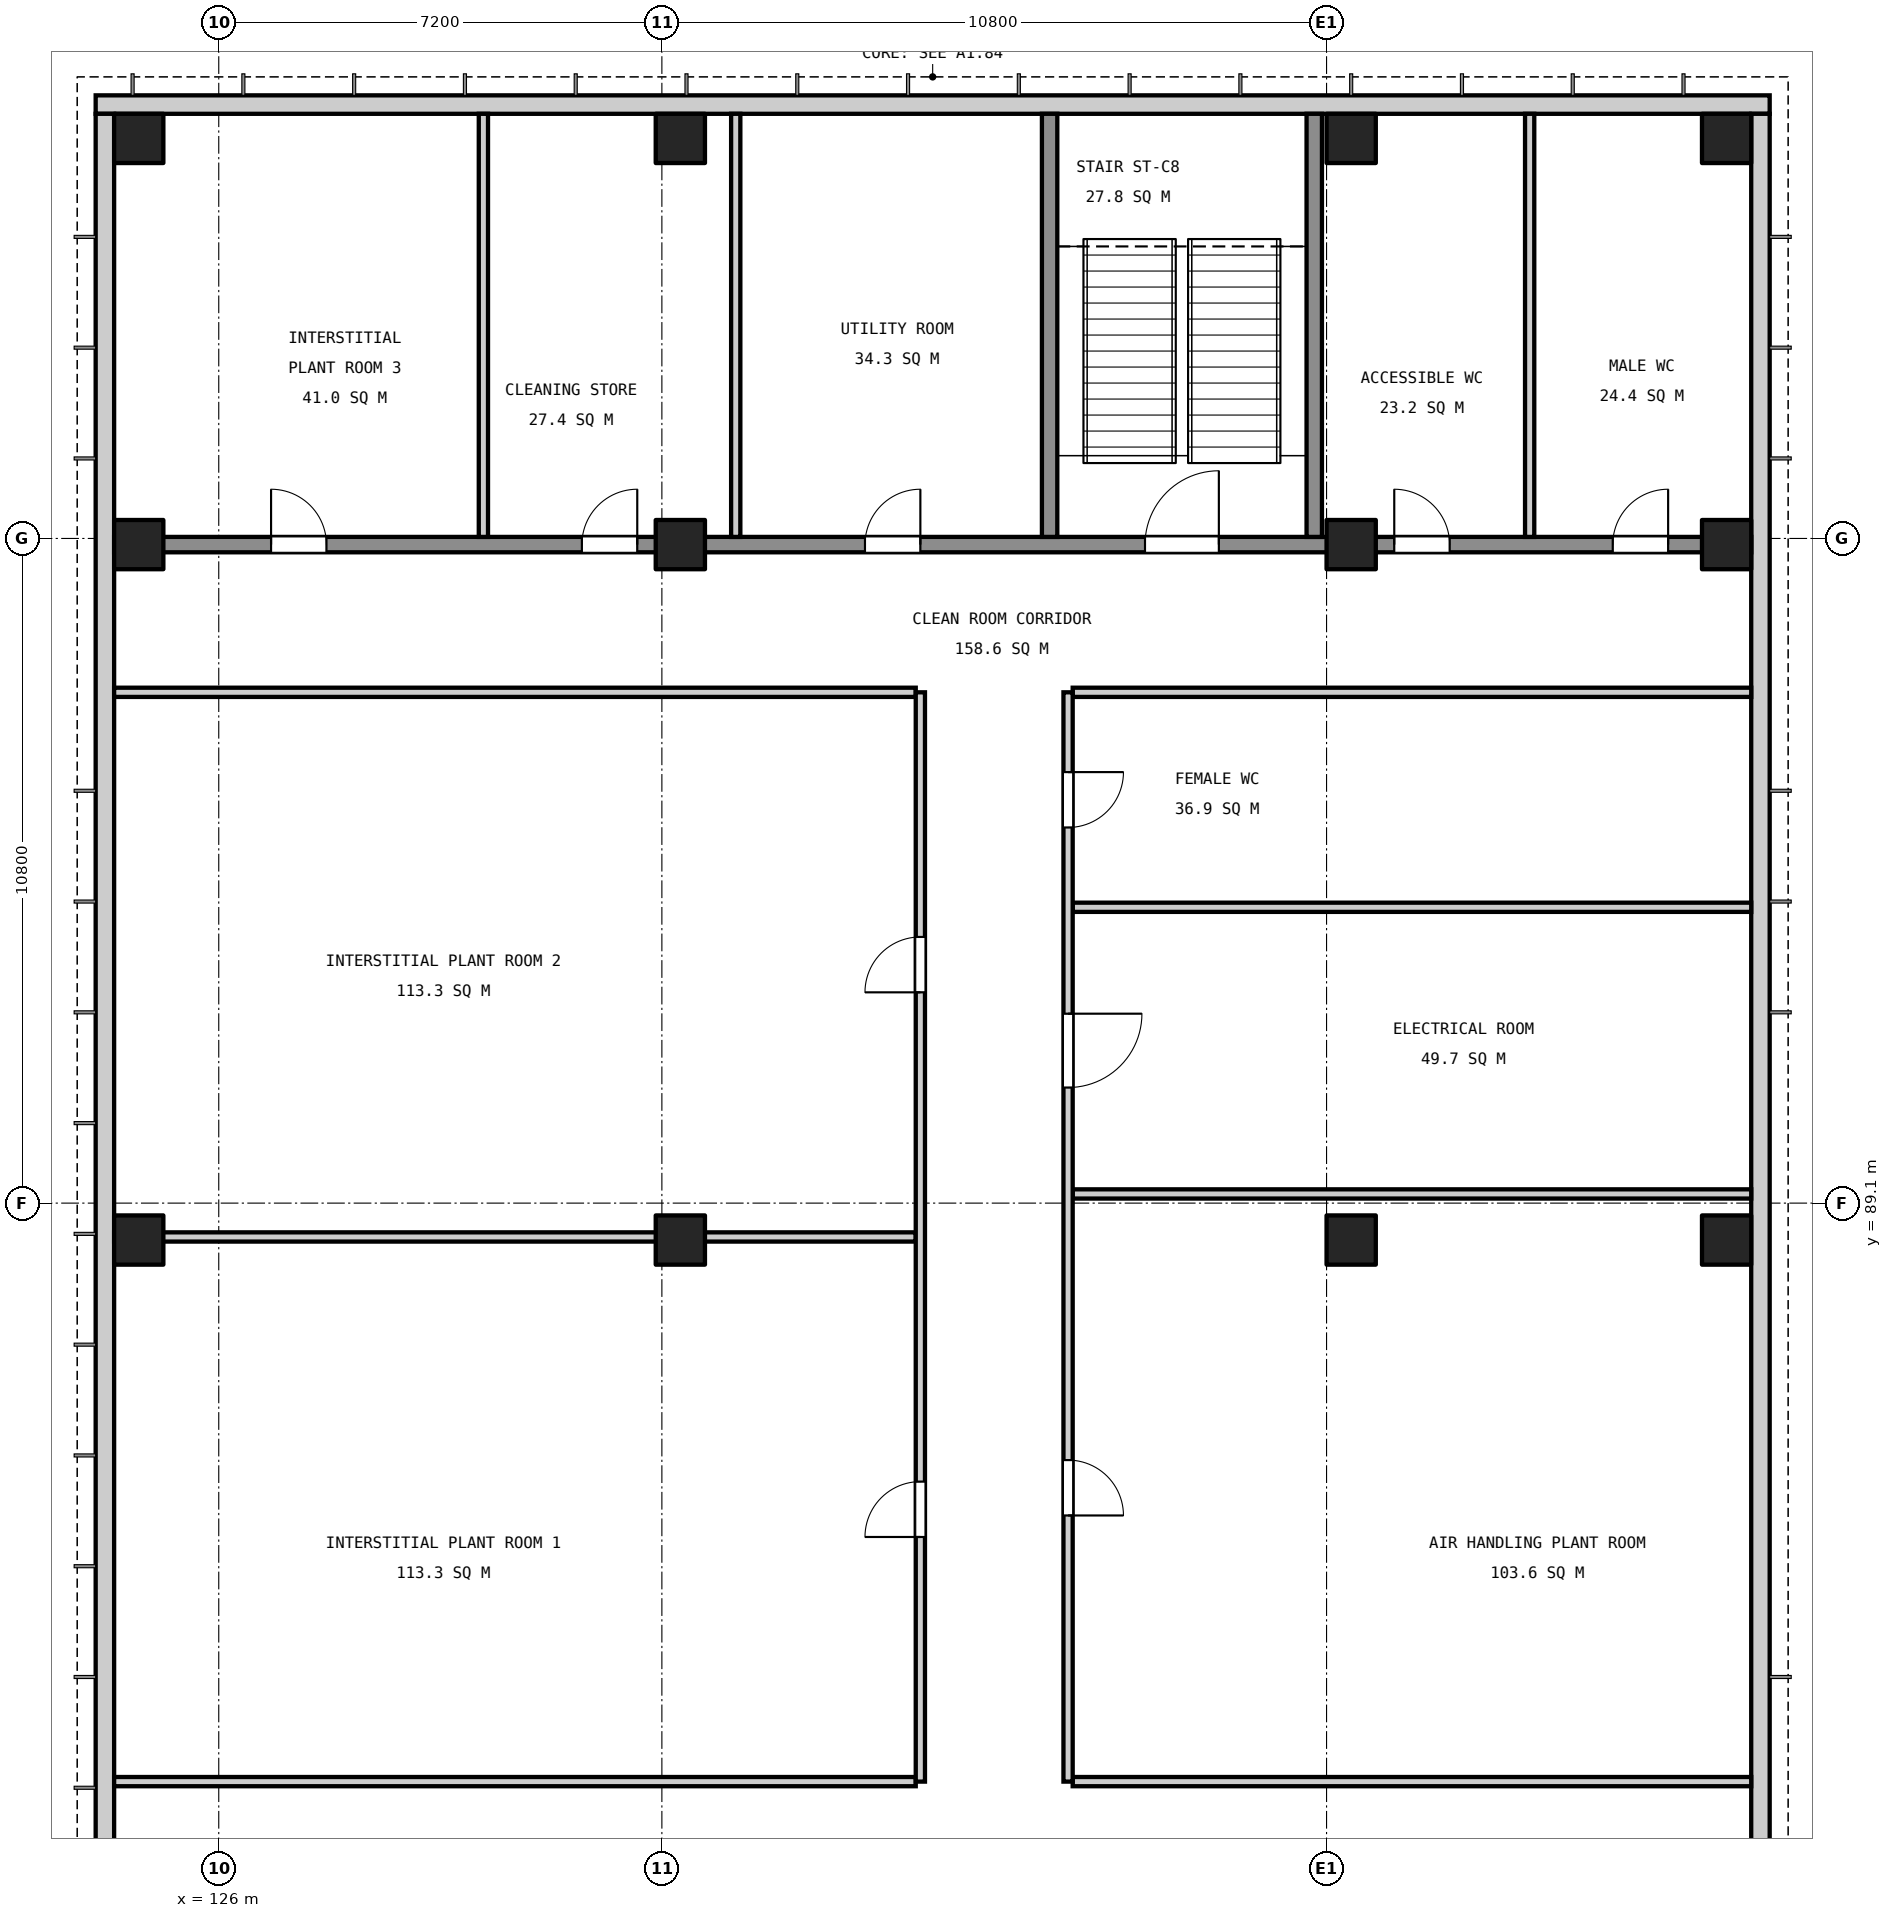
"""IFC4 building model, lengths in metres.
Left out: names, types, materials, properties, quantities, classifications, styles, units other than length and angle.
Written with IfcOpenShell. Run it as: python <this file> out.ifc"""

import sys

from ifc_helpers import new_model, si_unit, direction, frame, frame_2d, origin, origin_2d, place, context, subcontext, project, spatial, rectangle, extrude, element, fill, save


model = new_model("IFC4")
c1 = context("Model", 3, precision=1e-05, world=origin(), true_north=direction((0.0, 1.0)))
c2 = subcontext(c1, "Body", "Model", "MODEL_VIEW")
j1 = project(units=[si_unit("LENGTHUNIT", "METRE"), si_unit("PLANEANGLEUNIT", "RADIAN")], contexts=[c1])
p1 = place(None, origin())
s1 = spatial("IfcSite", under=j1, at=p1, CompositionType="ELEMENT")
p2 = place(p1, origin())
s2 = spatial("IfcBuilding", under=s1, at=p2, CompositionType="ELEMENT")
p3 = place(p2, frame((0.0, 0.0, 16.8)))
s3 = spatial("IfcBuildingStorey", under=s2, at=p3, CompositionType="ELEMENT", Elevation=16.8)
for number, where, z_axis, x_axis in (
    (1, (124.7, 88.5, 0.0), (0.0, 0.0, 1.0), (1.0, 0.0, 0.0)),
    (2, (124.7, 99.8, 0.0), (0.0, 0.0, 1.0), (1.0, 0.0, 0.0)),
    (3, (124.7, 106.4, 0.0), (0.0, 0.0, 1.0), (1.0, 0.0, 0.0)),
    (4, (133.5, 88.5, 0.0), (0.0, 0.0, 1.0), (1.0, 0.0, 0.0)),
    (5, (133.5, 99.8, 0.0), (0.0, 0.0, 1.0), (1.0, 0.0, 0.0)),
    (6, (133.5, 106.4, 0.0), (0.0, 0.0, 1.0), (1.0, 0.0, 0.0)),
    (7, (144.4, 88.5, 0.0), (0.0, 0.0, 1.0), (1.0, 0.0, 0.0)),
    (8, (144.4, 99.8, 0.0), (0.0, 0.0, 1.0), (1.0, 0.0, 0.0)),
    (9, (144.4, 106.4, 0.0), (0.0, 0.0, 1.0), (1.0, 0.0, 0.0)),
    (10, (150.5, 88.5, 0.0), (0.0, 0.0, 1.0), (1.0, 0.0, 0.0)),
    (11, (150.5, 99.8, 0.0), (0.0, 0.0, 1.0), (1.0, 0.0, 0.0)),
    (12, (150.5, 106.4, 0.0), (0.0, 0.0, 1.0), (1.0, 0.0, 0.0)),
):
    element("IfcColumn", number, at=place(p3, frame(where, z_axis=z_axis, x_axis=x_axis)), inside=s3, PredefinedType="COLUMN", context=c2, shape_type="SweptSolid", body=[
        extrude(rectangle(XDim=0.8, YDim=0.8, at=origin_2d()), origin(), (0.0, 0.0, 1.0), 5.4),
    ])
p4 = place(p3, frame((124.0, 106.95, 0.0), z_axis=(0.0, 0.0, 1.0), x_axis=(1.0, 0.0, 0.0)))
e13 = element("IfcWall", 13, at=p4, inside=s3, PredefinedType="SOLIDWALL", context=c2, shape_type="SweptSolid", body=[
    extrude(rectangle(XDim=27.2, YDim=0.3, at=frame_2d((13.6, 0.0))), origin(), (0.0, 0.0, 1.0), 4.95),
])
for number, where, z_axis, x_axis in (
    (14, (124.15, 70.3, 0.0), (0.0, 0.0, 1.0), (0.0, 1.0, 0.0)),
    (15, (151.05, 70.3, 0.0), (0.0, 0.0, 1.0), (0.0, 1.0, 0.0)),
):
    element("IfcWall", number, at=place(p3, frame(where, z_axis=z_axis, x_axis=x_axis)), inside=s3, PredefinedType="SOLIDWALL", context=c2, shape_type="SweptSolid", body=[
        extrude(rectangle(XDim=36.5, YDim=0.3, at=frame_2d((18.25, 0.0))), origin(), (0.0, 0.0, 1.0), 4.95),
    ])
p5 = place(p3, frame((124.3, 79.7, 0.0), z_axis=(0.0, 0.0, 1.0), x_axis=(1.0, 0.0, 0.0)))
e16 = element("IfcWall", 16, at=p5, inside=s3, PredefinedType="SOLIDWALL", context=c2, shape_type="SweptSolid", body=[
    extrude(rectangle(XDim=13.025, YDim=0.15, at=frame_2d((6.512, 0.0))), origin(), (0.0, 0.0, 1.0), 4.95),
])
p6 = place(p3, frame((139.875, 79.7, 0.0), z_axis=(0.0, 0.0, 1.0), x_axis=(1.0, 0.0, 0.0)))
e17 = element("IfcWall", 17, at=p6, inside=s3, PredefinedType="SOLIDWALL", context=c2, shape_type="SweptSolid", body=[
    extrude(rectangle(XDim=11.025, YDim=0.15, at=frame_2d((5.512, 0.0))), origin(), (0.0, 0.0, 1.0), 4.95),
])
p7 = place(p3, frame((124.3, 88.55, 0.0), z_axis=(0.0, 0.0, 1.0), x_axis=(1.0, 0.0, 0.0)))
e18 = element("IfcWall", 18, at=p7, inside=s3, PredefinedType="SOLIDWALL", context=c2, shape_type="SweptSolid", body=[
    extrude(rectangle(XDim=13.025, YDim=0.15, at=frame_2d((6.512, 0.0))), origin(), (0.0, 0.0, 1.0), 4.95),
])
for number, where, z_axis, x_axis in (
    (19, (139.875, 89.249, 0.0), (0.0, 0.0, 1.0), (1.0, 0.0, 0.0)),
    (20, (139.875, 93.907, 0.0), (0.0, 0.0, 1.0), (1.0, 0.0, 0.0)),
):
    element("IfcWall", number, at=place(p3, frame(where, z_axis=z_axis, x_axis=x_axis)), inside=s3, PredefinedType="SOLIDWALL", context=c2, shape_type="SweptSolid", body=[
        extrude(rectangle(XDim=11.025, YDim=0.15, at=frame_2d((5.512, 0.0))), origin(), (0.0, 0.0, 1.0), 4.95),
    ])
p8 = place(p3, frame((124.3, 97.4, 0.0), z_axis=(0.0, 0.0, 1.0), x_axis=(1.0, 0.0, 0.0)))
e21 = element("IfcWall", 21, at=p8, inside=s3, PredefinedType="SOLIDWALL", context=c2, shape_type="SweptSolid", body=[
    extrude(rectangle(XDim=13.025, YDim=0.15, at=frame_2d((6.512, 0.0))), origin(), (0.0, 0.0, 1.0), 4.95),
])
p9 = place(p3, frame((139.875, 97.4, 0.0), z_axis=(0.0, 0.0, 1.0), x_axis=(1.0, 0.0, 0.0)))
e22 = element("IfcWall", 22, at=p9, inside=s3, PredefinedType="SOLIDWALL", context=c2, shape_type="SweptSolid", body=[
    extrude(rectangle(XDim=11.025, YDim=0.15, at=frame_2d((5.512, 0.0))), origin(), (0.0, 0.0, 1.0), 4.95),
])
p10 = place(p3, frame((124.3, 99.8, 0.0), z_axis=(0.0, 0.0, 1.0), x_axis=(1.0, 0.0, 0.0)))
e23 = element("IfcWall", 23, at=p10, inside=s3, PredefinedType="SOLIDWALL", context=c2, shape_type="SweptSolid", body=[
    extrude(rectangle(XDim=26.6, YDim=0.25, at=frame_2d((13.3, 0.0))), origin(), (0.0, 0.0, 1.0), 4.95),
])
p11 = place(p10, frame((2.55, 0.0, 0.0)))
e24 = element("IfcOpeningElement", 24, at=p11, cuts=e23, PredefinedType="OPENING", context=c2, shape_type="SweptSolid", body=[
    extrude(rectangle(XDim=0.9, YDim=2.1, at=frame_2d((0.45, 1.05))), frame((0.0, 0.135, 0.0), z_axis=(0.0, -1.0, 0.0), x_axis=(1.0, 0.0, 0.0)), (0.0, 0.0, 1.0), 0.27),
])
p12 = place(p10, frame((7.6, 0.0, 0.0)))
e25 = element("IfcOpeningElement", 25, at=p12, cuts=e23, PredefinedType="OPENING", context=c2, shape_type="SweptSolid", body=[
    extrude(rectangle(XDim=0.9, YDim=2.1, at=frame_2d((0.45, 1.05))), frame((0.0, 0.135, 0.0), z_axis=(0.0, -1.0, 0.0), x_axis=(1.0, 0.0, 0.0)), (0.0, 0.0, 1.0), 0.27),
])
p13 = place(p10, frame((20.8, 0.0, 0.0)))
e26 = element("IfcOpeningElement", 26, at=p13, cuts=e23, PredefinedType="OPENING", context=c2, shape_type="SweptSolid", body=[
    extrude(rectangle(XDim=0.9, YDim=2.1, at=frame_2d((0.45, 1.05))), frame((0.0, 0.135, 0.0), z_axis=(0.0, -1.0, 0.0), x_axis=(1.0, 0.0, 0.0)), (0.0, 0.0, 1.0), 0.27),
])
p14 = place(p10, frame((24.35, 0.0, 0.0)))
e27 = element("IfcOpeningElement", 27, at=p14, cuts=e23, PredefinedType="OPENING", context=c2, shape_type="SweptSolid", body=[
    extrude(rectangle(XDim=0.9, YDim=2.1, at=frame_2d((0.45, 1.05))), frame((0.0, 0.135, 0.0), z_axis=(0.0, -1.0, 0.0), x_axis=(1.0, 0.0, 0.0)), (0.0, 0.0, 1.0), 0.27),
])
p15 = place(p10, frame((12.2, 0.0, 0.0)))
e28 = element("IfcOpeningElement", 28, at=p15, cuts=e23, PredefinedType="OPENING", context=c2, shape_type="SweptSolid", body=[
    extrude(rectangle(XDim=0.9, YDim=2.1, at=frame_2d((0.45, 1.05))), frame((0.0, 0.135, 0.0), z_axis=(0.0, -1.0, 0.0), x_axis=(1.0, 0.0, 0.0)), (0.0, 0.0, 1.0), 0.27),
])
p16 = place(p10, frame((16.75, 0.0, 0.0)))
e29 = element("IfcOpeningElement", 29, at=p16, cuts=e23, PredefinedType="OPENING", context=c2, shape_type="SweptSolid", body=[
    extrude(rectangle(XDim=1.2, YDim=2.1, at=frame_2d((0.6, 1.05))), frame((0.0, 0.135, 0.0), z_axis=(0.0, -1.0, 0.0), x_axis=(1.0, 0.0, 0.0)), (0.0, 0.0, 1.0), 0.27),
])
for number, where, z_axis, x_axis in (
    (30, (130.3, 99.925, 0.0), (0.0, 0.0, 1.0), (0.0, 1.0, 0.0)),
    (31, (134.4, 99.925, 0.0), (0.0, 0.0, 1.0), (0.0, 1.0, 0.0)),
):
    element("IfcWall", number, at=place(p3, frame(where, z_axis=z_axis, x_axis=x_axis)), inside=s3, PredefinedType="SOLIDWALL", context=c2, shape_type="SweptSolid", body=[
        extrude(rectangle(XDim=6.875, YDim=0.15, at=frame_2d((3.438, 0.0))), origin(), (0.0, 0.0, 1.0), 4.95),
    ])
p17 = place(p3, frame((137.4, 79.7, 0.0), z_axis=(0.0, 0.0, 1.0), x_axis=(0.0, 1.0, 0.0)))
e32 = element("IfcWall", 32, at=p17, inside=s3, PredefinedType="SOLIDWALL", context=c2, shape_type="SweptSolid", body=[
    extrude(rectangle(XDim=17.7, YDim=0.15, at=frame_2d((8.85, 0.0))), origin(), (0.0, 0.0, 1.0), 4.95),
])
p18 = place(p17, frame((3.975, 0.0, 0.0)))
e33 = element("IfcOpeningElement", 33, at=p18, cuts=e32, PredefinedType="OPENING", context=c2, shape_type="SweptSolid", body=[
    extrude(rectangle(XDim=0.9, YDim=2.1, at=frame_2d((0.45, 1.05))), frame((0.0, 0.085, 0.0), z_axis=(0.0, -1.0, 0.0), x_axis=(1.0, 0.0, 0.0)), (0.0, 0.0, 1.0), 0.17),
])
p19 = place(p17, frame((12.825, 0.0, 0.0)))
e34 = element("IfcOpeningElement", 34, at=p19, cuts=e32, PredefinedType="OPENING", context=c2, shape_type="SweptSolid", body=[
    extrude(rectangle(XDim=0.9, YDim=2.1, at=frame_2d((0.45, 1.05))), frame((0.0, 0.085, 0.0), z_axis=(0.0, -1.0, 0.0), x_axis=(1.0, 0.0, 0.0)), (0.0, 0.0, 1.0), 0.17),
])
p20 = place(p3, frame((139.5, 99.925, 0.0), z_axis=(0.0, 0.0, 1.0), x_axis=(0.0, 1.0, 0.0)))
e35 = element("IfcWall", 35, at=p20, inside=s3, PredefinedType="SOLIDWALL", context=c2, shape_type="SweptSolid", body=[
    extrude(rectangle(XDim=6.875, YDim=0.25, at=frame_2d((3.438, 0.0))), origin(), (0.0, 0.0, 1.0), 4.95),
])
p21 = place(p3, frame((139.8, 79.7, 0.0), z_axis=(0.0, 0.0, 1.0), x_axis=(0.0, 1.0, 0.0)))
e36 = element("IfcWall", 36, at=p21, inside=s3, PredefinedType="SOLIDWALL", context=c2, shape_type="SweptSolid", body=[
    extrude(rectangle(XDim=17.7, YDim=0.15, at=frame_2d((8.85, 0.0))), origin(), (0.0, 0.0, 1.0), 4.95),
])
p22 = place(p21, frame((4.324, 0.0, 0.0)))
e37 = element("IfcOpeningElement", 37, at=p22, cuts=e36, PredefinedType="OPENING", context=c2, shape_type="SweptSolid", body=[
    extrude(rectangle(XDim=0.9, YDim=2.1, at=frame_2d((0.45, 1.05))), frame((0.0, 0.085, 0.0), z_axis=(0.0, -1.0, 0.0), x_axis=(1.0, 0.0, 0.0)), (0.0, 0.0, 1.0), 0.17),
])
p23 = place(p21, frame((11.278, 0.0, 0.0)))
e38 = element("IfcOpeningElement", 38, at=p23, cuts=e36, PredefinedType="OPENING", context=c2, shape_type="SweptSolid", body=[
    extrude(rectangle(XDim=1.2, YDim=2.1, at=frame_2d((0.6, 1.05))), frame((0.0, 0.085, 0.0), z_axis=(0.0, -1.0, 0.0), x_axis=(1.0, 0.0, 0.0)), (0.0, 0.0, 1.0), 0.17),
])
p24 = place(p21, frame((15.503, 0.0, 0.0)))
e39 = element("IfcOpeningElement", 39, at=p24, cuts=e36, PredefinedType="OPENING", context=c2, shape_type="SweptSolid", body=[
    extrude(rectangle(XDim=0.9, YDim=2.1, at=frame_2d((0.45, 1.05))), frame((0.0, 0.085, 0.0), z_axis=(0.0, -1.0, 0.0), x_axis=(1.0, 0.0, 0.0)), (0.0, 0.0, 1.0), 0.17),
])
p25 = place(p3, frame((143.8, 99.925, 0.0), z_axis=(0.0, 0.0, 1.0), x_axis=(0.0, 1.0, 0.0)))
e40 = element("IfcWall", 40, at=p25, inside=s3, PredefinedType="SOLIDWALL", context=c2, shape_type="SweptSolid", body=[
    extrude(rectangle(XDim=6.875, YDim=0.25, at=frame_2d((3.438, 0.0))), origin(), (0.0, 0.0, 1.0), 4.95),
])
p26 = place(p3, frame((147.3, 99.925, 0.0), z_axis=(0.0, 0.0, 1.0), x_axis=(0.0, 1.0, 0.0)))
e41 = element("IfcWall", 41, at=p26, inside=s3, PredefinedType="SOLIDWALL", context=c2, shape_type="SweptSolid", body=[
    extrude(rectangle(XDim=6.875, YDim=0.15, at=frame_2d((3.438, 0.0))), origin(), (0.0, 0.0, 1.0), 4.95),
])
p27 = place(p18, origin())
e42 = element("IfcDoor", 42, at=p27, inside=s3, OperationType="SINGLE_SWING_LEFT", PredefinedType="DOOR", context=c2, shape_type="SweptSolid", body=[
    extrude(rectangle(XDim=0.9, YDim=2.1, at=frame_2d((0.45, 1.05))), frame((0.0, 0.025, 0.0), z_axis=(0.0, -1.0, 0.0), x_axis=(1.0, 0.0, 0.0)), (0.0, 0.0, 1.0), 0.05),
])
fill(e33, e42)
p28 = place(p19, origin())
e43 = element("IfcDoor", 43, at=p28, inside=s3, OperationType="SINGLE_SWING_LEFT", PredefinedType="DOOR", context=c2, shape_type="SweptSolid", body=[
    extrude(rectangle(XDim=0.9, YDim=2.1, at=frame_2d((0.45, 1.05))), frame((0.0, 0.025, 0.0), z_axis=(0.0, -1.0, 0.0), x_axis=(1.0, 0.0, 0.0)), (0.0, 0.0, 1.0), 0.05),
])
fill(e34, e43)
p29 = place(p22, frame((0.9, 0.0, 0.0), z_axis=(0.0, 0.0, 1.0), x_axis=(-1.0, 0.0, 0.0)))
e44 = element("IfcDoor", 44, at=p29, inside=s3, OperationType="SINGLE_SWING_RIGHT", PredefinedType="DOOR", context=c2, shape_type="SweptSolid", body=[
    extrude(rectangle(XDim=0.9, YDim=2.1, at=frame_2d((0.45, 1.05))), frame((0.0, 0.025, 0.0), z_axis=(0.0, -1.0, 0.0), x_axis=(1.0, 0.0, 0.0)), (0.0, 0.0, 1.0), 0.05),
])
fill(e37, e44)
p30 = place(p23, frame((1.2, 0.0, 0.0), z_axis=(0.0, 0.0, 1.0), x_axis=(-1.0, 0.0, 0.0)))
e45 = element("IfcDoor", 45, at=p30, inside=s3, OperationType="SINGLE_SWING_LEFT", PredefinedType="DOOR", context=c2, shape_type="SweptSolid", body=[
    extrude(rectangle(XDim=1.2, YDim=2.1, at=frame_2d((0.6, 1.05))), frame((0.0, 0.025, 0.0), z_axis=(0.0, -1.0, 0.0), x_axis=(1.0, 0.0, 0.0)), (0.0, 0.0, 1.0), 0.05),
])
fill(e38, e45)
p31 = place(p24, frame((0.9, 0.0, 0.0), z_axis=(0.0, 0.0, 1.0), x_axis=(-1.0, 0.0, 0.0)))
e46 = element("IfcDoor", 46, at=p31, inside=s3, OperationType="SINGLE_SWING_LEFT", PredefinedType="DOOR", context=c2, shape_type="SweptSolid", body=[
    extrude(rectangle(XDim=0.9, YDim=2.1, at=frame_2d((0.45, 1.05))), frame((0.0, 0.025, 0.0), z_axis=(0.0, -1.0, 0.0), x_axis=(1.0, 0.0, 0.0)), (0.0, 0.0, 1.0), 0.05),
])
fill(e39, e46)
p32 = place(p11, origin())
e47 = element("IfcDoor", 47, at=p32, inside=s3, OperationType="SINGLE_SWING_LEFT", PredefinedType="DOOR", context=c2, shape_type="SweptSolid", body=[
    extrude(rectangle(XDim=0.9, YDim=2.1, at=frame_2d((0.45, 1.05))), frame((0.0, 0.025, 0.0), z_axis=(0.0, -1.0, 0.0), x_axis=(1.0, 0.0, 0.0)), (0.0, 0.0, 1.0), 0.05),
])
fill(e24, e47)
p33 = place(p12, origin())
e48 = element("IfcDoor", 48, at=p33, inside=s3, OperationType="SINGLE_SWING_RIGHT", PredefinedType="DOOR", context=c2, shape_type="SweptSolid", body=[
    extrude(rectangle(XDim=0.9, YDim=2.1, at=frame_2d((0.45, 1.05))), frame((0.0, 0.025, 0.0), z_axis=(0.0, -1.0, 0.0), x_axis=(1.0, 0.0, 0.0)), (0.0, 0.0, 1.0), 0.05),
])
fill(e25, e48)
p34 = place(p13, origin())
e49 = element("IfcDoor", 49, at=p34, inside=s3, OperationType="SINGLE_SWING_LEFT", PredefinedType="DOOR", context=c2, shape_type="SweptSolid", body=[
    extrude(rectangle(XDim=0.9, YDim=2.1, at=frame_2d((0.45, 1.05))), frame((0.0, 0.025, 0.0), z_axis=(0.0, -1.0, 0.0), x_axis=(1.0, 0.0, 0.0)), (0.0, 0.0, 1.0), 0.05),
])
fill(e26, e49)
p35 = place(p14, origin())
e50 = element("IfcDoor", 50, at=p35, inside=s3, OperationType="SINGLE_SWING_RIGHT", PredefinedType="DOOR", context=c2, shape_type="SweptSolid", body=[
    extrude(rectangle(XDim=0.9, YDim=2.1, at=frame_2d((0.45, 1.05))), frame((0.0, 0.025, 0.0), z_axis=(0.0, -1.0, 0.0), x_axis=(1.0, 0.0, 0.0)), (0.0, 0.0, 1.0), 0.05),
])
fill(e27, e50)
p36 = place(p15, origin())
e51 = element("IfcDoor", 51, at=p36, inside=s3, OperationType="SINGLE_SWING_RIGHT", PredefinedType="DOOR", context=c2, shape_type="SweptSolid", body=[
    extrude(rectangle(XDim=0.9, YDim=2.1, at=frame_2d((0.45, 1.05))), frame((0.0, 0.025, 0.0), z_axis=(0.0, -1.0, 0.0), x_axis=(1.0, 0.0, 0.0)), (0.0, 0.0, 1.0), 0.05),
])
fill(e28, e51)
p37 = place(p16, origin())
e52 = element("IfcDoor", 52, at=p37, inside=s3, OperationType="SINGLE_SWING_RIGHT", PredefinedType="DOOR", context=c2, shape_type="SweptSolid", body=[
    extrude(rectangle(XDim=1.2, YDim=2.1, at=frame_2d((0.6, 1.05))), frame((0.0, 0.025, 0.0), z_axis=(0.0, -1.0, 0.0), x_axis=(1.0, 0.0, 0.0)), (0.0, 0.0, 1.0), 0.05),
])
fill(e29, e52)
save(model, sys.argv[1])
